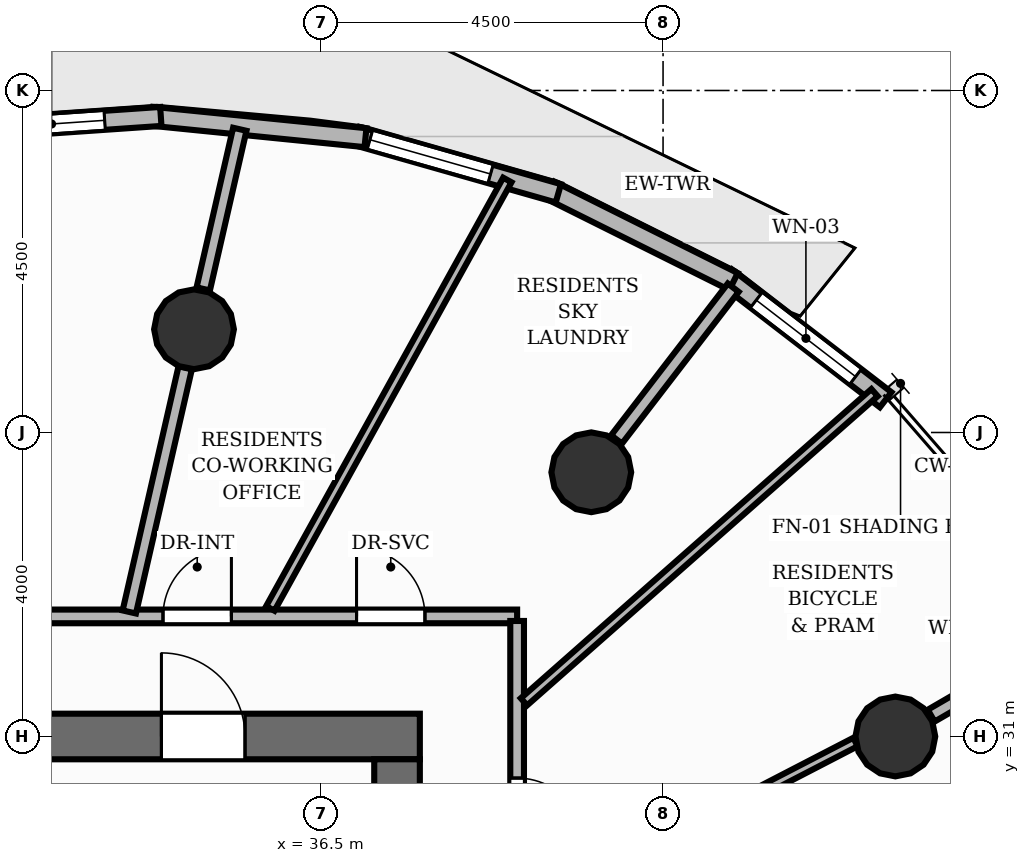
"""IFC4 building model, lengths in metres.
Left out: names, types, materials, properties, quantities, classifications, styles, units other than length and angle.
Written with IfcOpenShell. Run it as: python <this file> out.ifc"""

import sys

from ifc_helpers import new_model, si_unit, direction, frame, frame_2d, origin, origin_2d, place, context, subcontext, project, spatial, rectangle, circle, extrude, element, fill, save


model = new_model("IFC4")
c1 = context("Model", 3, precision=1e-05, world=origin(), true_north=direction((0.0, 1.0)))
c2 = subcontext(c1, "Body", "Model", "MODEL_VIEW")
j1 = project(units=[si_unit("LENGTHUNIT", "METRE"), si_unit("PLANEANGLEUNIT", "RADIAN")], contexts=[c1])
p1 = place(None, origin())
s1 = spatial("IfcSite", under=j1, at=p1, CompositionType="ELEMENT")
p2 = place(p1, origin())
s2 = spatial("IfcBuilding", under=s1, at=p2, CompositionType="ELEMENT")
p3 = place(p2, frame((0.0, 0.0, 148.96)))
s3 = spatial("IfcBuildingStorey", under=s2, at=p3, CompositionType="ELEMENT", Elevation=148.96)
p4 = place(p3, frame((22.7, 31.0, 0.0), z_axis=(0.0, 0.0, 1.0), x_axis=(1.0, 0.0, 0.0)))
e1 = element("IfcWall", 1, at=p4, inside=s3, PredefinedType="SHEAR", context=c2, shape_type="SweptSolid", body=[
    extrude(rectangle(XDim=15.1, YDim=0.6, at=frame_2d((7.55, 0.0))), origin(), (0.0, 0.0, 1.0), 3.2),
])
p5 = place(p4, frame((11.7, 0.0, 0.0)))
e2 = element("IfcOpeningElement", 2, at=p5, cuts=e1, PredefinedType="OPENING", context=c2, shape_type="SweptSolid", body=[
    extrude(rectangle(XDim=1.1, YDim=2.15, at=frame_2d((0.55, 1.075))), frame((0.0, 0.31, 0.0), z_axis=(0.0, -1.0, 0.0), x_axis=(1.0, 0.0, 0.0)), (0.0, 0.0, 1.0), 0.62),
])
p6 = place(p3, frame((37.5, 17.3, 0.0), z_axis=(0.0, 0.0, 1.0), x_axis=(0.0, 1.0, 0.0)))
e3 = element("IfcWall", 3, at=p6, inside=s3, PredefinedType="SHEAR", context=c2, shape_type="SweptSolid", body=[
    extrude(rectangle(XDim=13.4, YDim=0.6, at=frame_2d((6.7, 0.0))), origin(), (0.0, 0.0, 1.0), 3.2),
])
for number, where, z_axis, x_axis in (
    (4, (44.056, 31.0, 0.0), (0.0, 0.0, 1.0), (1.0, 0.0, 0.0)),
    (5, (40.056, 34.477, 0.0), (0.0, 0.0, 1.0), (1.0, 0.0, 0.0)),
    (6, (34.829, 36.358, 0.0), (0.0, 0.0, 1.0), (1.0, 0.0, 0.0)),
):
    element("IfcColumn", number, at=place(p3, frame(where, z_axis=z_axis, x_axis=x_axis)), inside=s3, PredefinedType="COLUMN", context=c2, shape_type="SweptSolid", body=[
        extrude(circle(Radius=0.525, at=origin_2d()), origin(), (0.0, 0.0, 1.0), 3.2),
    ])
p7 = place(p3, frame((41.831, 37.046, 0.0), z_axis=(0.0, 0.0, 1.0), x_axis=(0.7923805969, -0.610027040103, 0.0)))
e7 = element("IfcWall", 7, at=p7, inside=s3, PredefinedType="SOLIDWALL", context=c2, shape_type="SweptSolid", body=[
    extrude(rectangle(XDim=2.648, YDim=0.25, at=frame_2d((1.324, 0.0))), origin(), (0.0, 0.0, 1.0), 2.96),
])
p8 = place(p7, frame((0.499, 0.0, 0.85)))
e8 = element("IfcOpeningElement", 8, at=p8, cuts=e7, PredefinedType="OPENING", context=c2, shape_type="SweptSolid", body=[
    extrude(rectangle(XDim=1.65, YDim=1.55, at=frame_2d((0.825, 0.775))), frame((0.0, 0.135, 0.0), z_axis=(0.0, -1.0, 0.0), x_axis=(1.0, 0.0, 0.0)), (0.0, 0.0, 1.0), 0.27),
])
p9 = place(p3, frame((39.517, 38.188, 0.0), z_axis=(0.0, 0.0, 1.0), x_axis=(0.894843809708, -0.446379385979, 0.0)))
e9 = element("IfcWall", 9, at=p9, inside=s3, PredefinedType="SOLIDWALL", context=c2, shape_type="SweptSolid", body=[
    extrude(rectangle(XDim=2.693, YDim=0.25, at=frame_2d((1.347, 0.0))), origin(), (0.0, 0.0, 1.0), 2.96),
])
p10 = place(p3, frame((36.975, 38.9, 0.0), z_axis=(0.0, 0.0, 1.0), x_axis=(0.961851311091, -0.27357276062, 0.0)))
e10 = element("IfcWall", 10, at=p10, inside=s3, PredefinedType="SOLIDWALL", context=c2, shape_type="SweptSolid", body=[
    extrude(rectangle(XDim=2.752, YDim=0.25, at=frame_2d((1.376, 0.0))), origin(), (0.0, 0.0, 1.0), 2.96),
])
p11 = place(p10, frame((0.175, 0.0, 0.85)))
e11 = element("IfcOpeningElement", 11, at=p11, cuts=e10, PredefinedType="OPENING", context=c2, shape_type="SweptSolid", body=[
    extrude(rectangle(XDim=1.65, YDim=1.55, at=frame_2d((0.825, 0.775))), frame((0.0, 0.135, 0.0), z_axis=(0.0, -1.0, 0.0), x_axis=(1.0, 0.0, 0.0)), (0.0, 0.0, 1.0), 0.27),
])
p12 = place(p3, frame((34.281, 39.16, 0.0), z_axis=(0.0, 0.0, 1.0), x_axis=(0.995013999105, -0.099735357744, 0.0)))
e12 = element("IfcWall", 12, at=p12, inside=s3, PredefinedType="SOLIDWALL", context=c2, shape_type="SweptSolid", body=[
    extrude(rectangle(XDim=2.818, YDim=0.25, at=frame_2d((1.409, 0.0))), origin(), (0.0, 0.0, 1.0), 2.96),
])
p13 = place(p3, frame((31.517, 38.96, 0.0), z_axis=(0.0, 0.0, 1.0), x_axis=(0.997630729469, 0.068796276206, 0.0)))
e13 = element("IfcWall", 13, at=p13, inside=s3, PredefinedType="SOLIDWALL", context=c2, shape_type="SweptSolid", body=[
    extrude(rectangle(XDim=2.882, YDim=0.25, at=frame_2d((1.441, 0.0))), origin(), (0.0, 0.0, 1.0), 2.96),
])
p14 = place(p13, frame((0.741, 0.0, 0.85)))
e14 = element("IfcOpeningElement", 14, at=p14, cuts=e13, PredefinedType="OPENING", context=c2, shape_type="SweptSolid", body=[
    extrude(rectangle(XDim=1.4, YDim=1.55, at=frame_2d((0.7, 0.775))), frame((0.0, 0.135, 0.0), z_axis=(0.0, -1.0, 0.0), x_axis=(1.0, 0.0, 0.0)), (0.0, 0.0, 1.0), 0.27),
])
p15 = place(p3, frame((44.528, 31.274, 0.0), z_axis=(0.0, 0.0, 1.0), x_axis=(0.864802971131, 0.502111363268, 0.0)))
e15 = element("IfcWall", 15, at=p15, inside=s3, PredefinedType="PARTITIONING", context=c2, shape_type="SweptSolid", body=[
    extrude(rectangle(XDim=1.951, YDim=0.18, at=frame_2d((0.975, 0.0))), origin(), (0.0, 0.0, 1.0), 2.336),
])
p16 = place(p3, frame((40.388, 34.908, 0.0), z_axis=(0.0, 0.0, 1.0), x_axis=(0.609556175004, 0.792742877303, 0.0)))
e16 = element("IfcWall", 16, at=p16, inside=s3, PredefinedType="PARTITIONING", context=c2, shape_type="SweptSolid", body=[
    extrude(rectangle(XDim=2.519, YDim=0.18, at=frame_2d((1.259, 0.0))), origin(), (0.0, 0.0, 1.0), 2.336),
])
p17 = place(p3, frame((34.95, 36.889, 0.0), z_axis=(0.0, 0.0, 1.0), x_axis=(0.223080127706, 0.974800111111, 0.0)))
e17 = element("IfcWall", 17, at=p17, inside=s3, PredefinedType="PARTITIONING", context=c2, shape_type="SweptSolid", body=[
    extrude(rectangle(XDim=2.155, YDim=0.18, at=frame_2d((1.077, 0.0))), origin(), (0.0, 0.0, 1.0), 2.336),
])
p18 = place(p3, frame((21.42, 32.58, 0.0), z_axis=(0.0, 0.0, 1.0), x_axis=(1.0, 0.0, 0.0)))
e18 = element("IfcWall", 18, at=p18, inside=s3, PredefinedType="PARTITIONING", context=c2, shape_type="SweptSolid", body=[
    extrude(rectangle(XDim=17.66, YDim=0.18, at=frame_2d((8.83, 0.0))), origin(), (0.0, 0.0, 1.0), 2.955),
])
p19 = place(p18, frame((13.001, 0.0, 0.0)))
e19 = element("IfcOpeningElement", 19, at=p19, cuts=e18, PredefinedType="OPENING", context=c2, shape_type="SweptSolid", body=[
    extrude(rectangle(XDim=0.9, YDim=2.1, at=frame_2d((0.45, 1.05))), frame((0.0, 0.1, 0.0), z_axis=(0.0, -1.0, 0.0), x_axis=(1.0, 0.0, 0.0)), (0.0, 0.0, 1.0), 0.2),
])
p20 = place(p18, frame((15.547, 0.0, 0.0)))
e20 = element("IfcOpeningElement", 20, at=p20, cuts=e18, PredefinedType="OPENING", context=c2, shape_type="SweptSolid", body=[
    extrude(rectangle(XDim=0.9, YDim=2.1, at=frame_2d((0.45, 1.05))), frame((0.0, 0.1, 0.0), z_axis=(0.0, -1.0, 0.0), x_axis=(1.0, 0.0, 0.0)), (0.0, 0.0, 1.0), 0.2),
])
p21 = place(p18, frame((5.757, 0.0, 0.0)))
e21 = element("IfcOpeningElement", 21, at=p21, cuts=e18, PredefinedType="OPENING", context=c2, shape_type="SweptSolid", body=[
    extrude(rectangle(XDim=1.05, YDim=2.15, at=frame_2d((0.525, 1.075))), frame((0.0, 0.1, 0.0), z_axis=(0.0, -1.0, 0.0), x_axis=(1.0, 0.0, 0.0)), (0.0, 0.0, 1.0), 0.2),
])
p22 = place(p3, frame((39.08, 32.52, 0.0), z_axis=(0.0, 0.0, 1.0), x_axis=(0.0, -1.0, 0.0)))
e22 = element("IfcWall", 22, at=p22, inside=s3, PredefinedType="PARTITIONING", context=c2, shape_type="SweptSolid", body=[
    extrude(rectangle(XDim=3.918, YDim=0.18, at=frame_2d((1.959, 0.0))), origin(), (0.0, 0.0, 1.0), 2.955),
])
p23 = place(p22, frame((2.067, 0.0, 0.0)))
e23 = element("IfcOpeningElement", 23, at=p23, cuts=e22, PredefinedType="OPENING", context=c2, shape_type="SweptSolid", body=[
    extrude(rectangle(XDim=0.9, YDim=2.1, at=frame_2d((0.45, 1.05))), frame((0.0, 0.1, 0.0), z_axis=(0.0, -1.0, 0.0), x_axis=(1.0, 0.0, 0.0)), (0.0, 0.0, 1.0), 0.2),
])
p24 = place(p3, frame((38.951, 38.323, 0.0), z_axis=(0.0, 0.0, 1.0), x_axis=(-0.484039777335, -0.875045995338, 0.0)))
e24 = element("IfcWall", 24, at=p24, inside=s3, PredefinedType="PARTITIONING", context=c2, shape_type="SweptSolid", body=[
    extrude(rectangle(XDim=6.442, YDim=0.125, at=frame_2d((3.221, 0.0))), origin(), (0.0, 0.0, 1.0), 2.955),
])
p25 = place(p3, frame((33.977, 32.638, 0.0), z_axis=(0.0, 0.0, 1.0), x_axis=(0.22319287001, 0.974774303506, 0.0)))
e25 = element("IfcWall", 25, at=p25, inside=s3, PredefinedType="PARTITIONING", context=c2, shape_type="SweptSolid", body=[
    extrude(rectangle(XDim=3.296, YDim=0.18, at=frame_2d((1.648, 0.0))), origin(), (0.0, 0.0, 1.0), 2.336),
])
p26 = place(p3, frame((43.783, 35.524, 0.0), z_axis=(0.0, 0.0, 1.0), x_axis=(-0.750018545151, -0.661416798947, 0.0)))
e26 = element("IfcWall", 26, at=p26, inside=s3, PredefinedType="PARTITIONING", context=c2, shape_type="SweptSolid", body=[
    extrude(rectangle(XDim=6.15, YDim=0.125, at=frame_2d((3.075, 0.0))), origin(), (0.0, 0.0, 1.0), 2.692),
])
p27 = place(p3, frame((43.531, 30.927, 0.0), z_axis=(0.0, 0.0, 1.0), x_axis=(-0.888041341995, -0.459763607638, 0.0)))
e27 = element("IfcWall", 27, at=p27, inside=s3, PredefinedType="PARTITIONING", context=c2, shape_type="SweptSolid", body=[
    extrude(rectangle(XDim=4.893, YDim=0.125, at=frame_2d((2.446, 0.0))), origin(), (0.0, 0.0, 1.0), 2.336),
])
p28 = place(p27, frame((1.996, 0.0, 0.0)))
e28 = element("IfcOpeningElement", 28, at=p28, cuts=e27, PredefinedType="OPENING", context=c2, shape_type="SweptSolid", body=[
    extrude(rectangle(XDim=0.9, YDim=2.1, at=frame_2d((0.45, 1.05))), frame((0.0, 0.073, 0.0), z_axis=(0.0, -1.0, 0.0), x_axis=(1.0, 0.0, 0.0)), (0.0, 0.0, 1.0), 0.145),
])
p29 = place(p3, frame((39.174, 27.577, 0.0), z_axis=(0.0, 0.0, 1.0), x_axis=(0.9372070401, 0.348773513883, 0.0)))
e29 = element("IfcWall", 29, at=p29, inside=s3, PredefinedType="PARTITIONING", context=c2, shape_type="SweptSolid", body=[
    extrude(rectangle(XDim=8.395, YDim=0.125, at=frame_2d((4.198, 0.0))), origin(), (0.0, 0.0, 1.0), 2.692),
])
p30 = place(p8, origin())
e30 = element("IfcWindow", 30, at=p30, inside=s3, PartitioningType="SINGLE_PANEL", PredefinedType="WINDOW", context=c2, shape_type="SweptSolid", body=[
    extrude(rectangle(XDim=1.65, YDim=1.55, at=frame_2d((0.825, 0.775))), frame((0.0, 0.03, 0.0), z_axis=(0.0, -1.0, 0.0), x_axis=(1.0, 0.0, 0.0)), (0.0, 0.0, 1.0), 0.06),
])
fill(e8, e30)
p31 = place(p11, origin())
e31 = element("IfcWindow", 31, at=p31, inside=s3, PartitioningType="SINGLE_PANEL", PredefinedType="WINDOW", context=c2, shape_type="SweptSolid", body=[
    extrude(rectangle(XDim=1.65, YDim=1.55, at=frame_2d((0.825, 0.775))), frame((0.0, 0.03, 0.0), z_axis=(0.0, -1.0, 0.0), x_axis=(1.0, 0.0, 0.0)), (0.0, 0.0, 1.0), 0.06),
])
fill(e11, e31)
p32 = place(p14, origin())
e32 = element("IfcWindow", 32, at=p32, inside=s3, PartitioningType="SINGLE_PANEL", PredefinedType="WINDOW", context=c2, shape_type="SweptSolid", body=[
    extrude(rectangle(XDim=1.4, YDim=1.55, at=frame_2d((0.7, 0.775))), frame((0.0, 0.03, 0.0), z_axis=(0.0, -1.0, 0.0), x_axis=(1.0, 0.0, 0.0)), (0.0, 0.0, 1.0), 0.06),
])
fill(e14, e32)
p33 = place(p5, origin())
e33 = element("IfcDoor", 33, at=p33, inside=s3, OperationType="SINGLE_SWING_LEFT", PredefinedType="DOOR", context=c2, shape_type="SweptSolid", body=[
    extrude(rectangle(XDim=1.1, YDim=2.15, at=frame_2d((0.55, 1.075))), frame((0.0, 0.025, 0.0), z_axis=(0.0, -1.0, 0.0), x_axis=(1.0, 0.0, 0.0)), (0.0, 0.0, 1.0), 0.05),
])
fill(e2, e33)
p34 = place(p19, origin())
e34 = element("IfcDoor", 34, at=p34, inside=s3, OperationType="SINGLE_SWING_RIGHT", PredefinedType="DOOR", context=c2, shape_type="SweptSolid", body=[
    extrude(rectangle(XDim=0.9, YDim=2.1, at=frame_2d((0.45, 1.05))), frame((0.0, 0.025, 0.0), z_axis=(0.0, -1.0, 0.0), x_axis=(1.0, 0.0, 0.0)), (0.0, 0.0, 1.0), 0.05),
])
fill(e19, e34)
p35 = place(p20, origin())
e35 = element("IfcDoor", 35, at=p35, inside=s3, OperationType="SINGLE_SWING_LEFT", PredefinedType="DOOR", context=c2, shape_type="SweptSolid", body=[
    extrude(rectangle(XDim=0.9, YDim=2.1, at=frame_2d((0.45, 1.05))), frame((0.0, 0.025, 0.0), z_axis=(0.0, -1.0, 0.0), x_axis=(1.0, 0.0, 0.0)), (0.0, 0.0, 1.0), 0.05),
])
fill(e20, e35)
p36 = place(p23, origin())
e36 = element("IfcDoor", 36, at=p36, inside=s3, OperationType="SINGLE_SWING_RIGHT", PredefinedType="DOOR", context=c2, shape_type="SweptSolid", body=[
    extrude(rectangle(XDim=0.9, YDim=2.1, at=frame_2d((0.45, 1.05))), frame((0.0, 0.025, 0.0), z_axis=(0.0, -1.0, 0.0), x_axis=(1.0, 0.0, 0.0)), (0.0, 0.0, 1.0), 0.05),
])
fill(e23, e36)
save(model, sys.argv[1])
